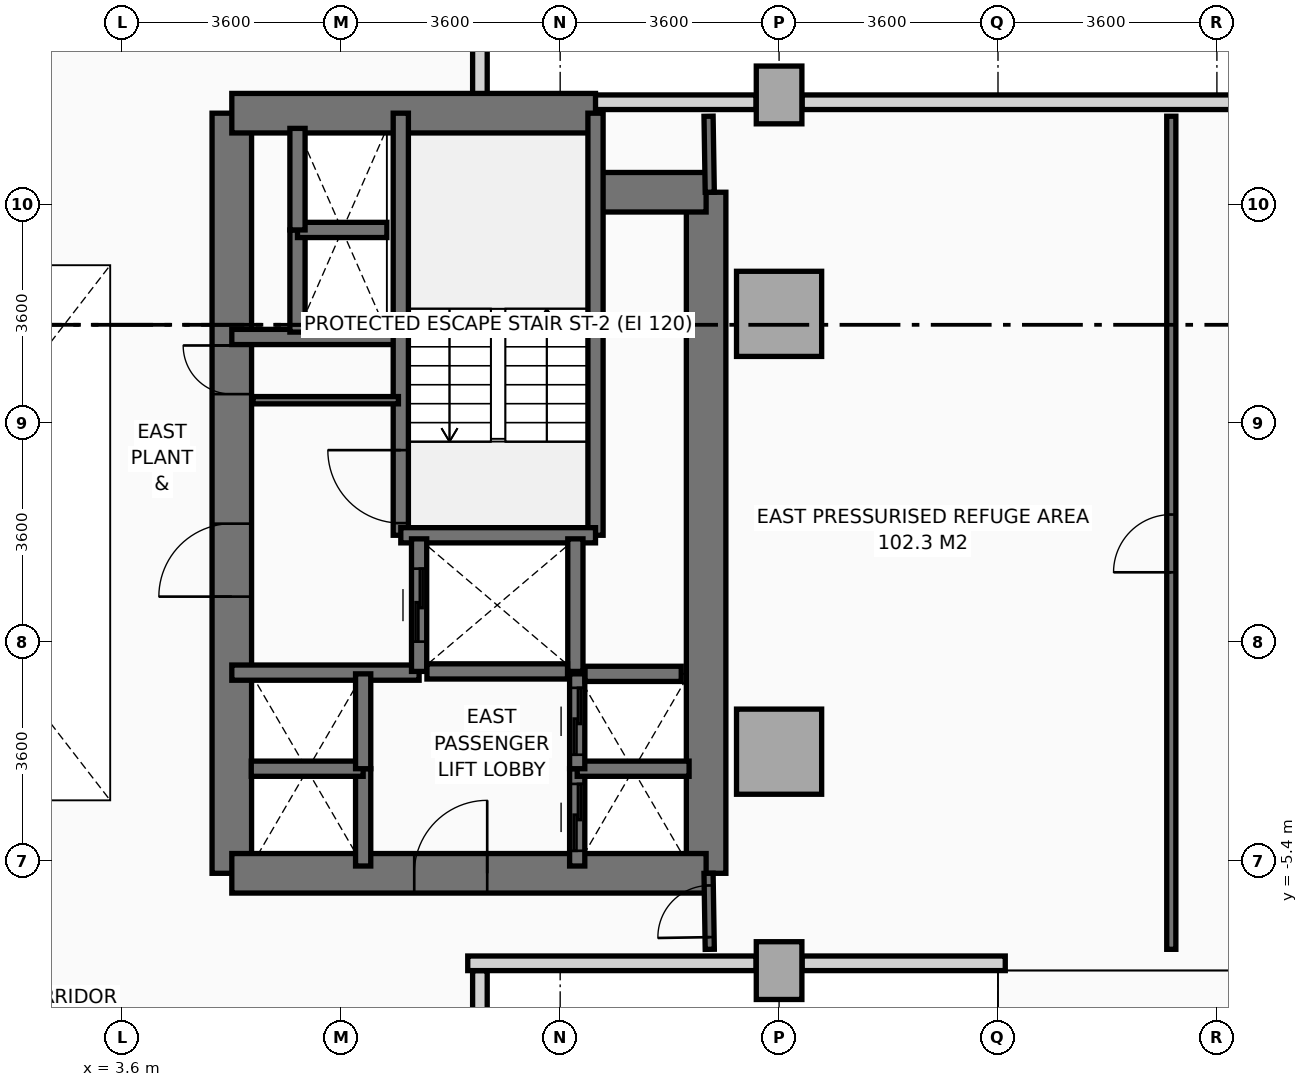
"""IFC4 building model, lengths in metres.
Left out: names, types, materials, properties, quantities, classifications, styles, units other than length and angle.
Written with IfcOpenShell. Run it as: python <this file> out.ifc"""

import sys

from ifc_helpers import new_model, si_unit, direction, frame, frame_2d, origin, origin_2d, place, context, subcontext, project, spatial, rectangle, extrude, source, transform, mapped, element, fill, save


model = new_model("IFC4")
c1 = context("Model", 3, precision=1e-05, world=origin(), true_north=direction((0.0, 1.0)))
c2 = subcontext(c1, "Body", "Model", "MODEL_VIEW")
j1 = project(units=[si_unit("LENGTHUNIT", "METRE"), si_unit("PLANEANGLEUNIT", "RADIAN")], contexts=[c1])
p1 = place(None, origin())
s1 = spatial("IfcSite", under=j1, at=p1, CompositionType="ELEMENT")
p2 = place(p1, origin())
s2 = spatial("IfcBuilding", under=s1, at=p2, CompositionType="ELEMENT")
p3 = place(p2, frame((0.0, 0.0, 25.2)))
s3 = spatial("IfcBuildingStorey", under=s2, at=p3, CompositionType="ELEMENT", Elevation=25.2)
m1 = source(origin(), c2, "Body", "SweptSolid", [
    extrude(rectangle(XDim=0.75, YDim=0.95, at=origin_2d()), origin(), (0.0, 0.0, 1.0), 5.2),
])
p4 = place(p3, frame((14.4, -7.2, 0.0), z_axis=(0.0, 0.0, 1.0), x_axis=(1.0, 0.0, 0.0)))
e1 = element("IfcColumn", 1, at=p4, inside=s3, PredefinedType="COLUMN", context=c2, shape_type="MappedRepresentation", body=[
    mapped(m1, transform((0.0, 0.0, 0.0), x_axis=(1.0, 0.0, 0.0), y_axis=(0.0, 1.0, 0.0), z_axis=(0.0, 0.0, 1.0), scale=1.0)),
])
m2 = source(origin(), c2, "Body", "SweptSolid", [
    extrude(rectangle(XDim=1.4, YDim=1.4, at=origin_2d()), origin(), (0.0, 0.0, 1.0), 5.2),
])
for number, where, z_axis, x_axis in (
    (2, (14.4, -3.6, 0.0), (0.0, 0.0, 1.0), (1.0, 0.0, 0.0)),
    (3, (14.4, 3.6, 0.0), (0.0, 0.0, 1.0), (1.0, 0.0, 0.0)),
):
    element("IfcColumn", number, at=place(p3, frame(where, z_axis=z_axis, x_axis=x_axis)), inside=s3, PredefinedType="COLUMN", context=c2, shape_type="MappedRepresentation", body=[
        mapped(m2, transform((0.0, 0.0, 0.0), x_axis=(1.0, 0.0, 0.0), y_axis=(0.0, 1.0, 0.0), z_axis=(0.0, 0.0, 1.0), scale=1.0)),
    ])
p5 = place(p3, frame((14.4, 7.2, 0.0), z_axis=(0.0, 0.0, 1.0), x_axis=(1.0, 0.0, 0.0)))
e4 = element("IfcColumn", 4, at=p5, inside=s3, PredefinedType="COLUMN", context=c2, shape_type="MappedRepresentation", body=[
    mapped(m1, transform((0.0, 0.0, 0.0), x_axis=(1.0, 0.0, 0.0), y_axis=(0.0, 1.0, 0.0), z_axis=(0.0, 0.0, 1.0), scale=1.0)),
])
p6 = place(p3, frame((18.119, -7.08, 0.0), z_axis=(0.0, 0.0, 1.0), x_axis=(-1.0, 0.0, 0.0)))
e5 = element("IfcWall", 5, at=p6, inside=s3, PredefinedType="PARAPET", context=c2, shape_type="SweptSolid", body=[
    extrude(rectangle(XDim=3.341, YDim=0.24, at=frame_2d((1.671, 0.0))), origin(), (0.0, 0.0, 1.0), 1.15),
])
p7 = place(p3, frame((14.022, -7.08, 0.0), z_axis=(0.0, 0.0, 1.0), x_axis=(-1.0, 0.0, 0.0)))
e6 = element("IfcWall", 6, at=p7, inside=s3, PredefinedType="PARAPET", context=c2, shape_type="SweptSolid", body=[
    extrude(rectangle(XDim=4.742, YDim=0.24, at=frame_2d((2.371, 0.0))), origin(), (0.0, 0.0, 1.0), 1.15),
])
p8 = place(p3, frame((9.48, -7.203, 0.0), z_axis=(0.0, 0.0, 1.0), x_axis=(0.0, -1.0, 0.0)))
e7 = element("IfcWall", 7, at=p8, inside=s3, PredefinedType="PARAPET", context=c2, shape_type="SweptSolid", body=[
    extrude(rectangle(XDim=1.586, YDim=0.24, at=frame_2d((0.793, 0.0))), origin(), (0.0, 0.0, 1.0), 1.15),
])
p9 = place(p3, frame((9.48, 8.789, 0.0), z_axis=(0.0, 0.0, 1.0), x_axis=(0.0, -1.0, 0.0)))
e8 = element("IfcWall", 8, at=p9, inside=s3, PredefinedType="PARAPET", context=c2, shape_type="SweptSolid", body=[
    extrude(rectangle(XDim=1.836, YDim=0.24, at=frame_2d((0.918, 0.0))), origin(), (0.0, 0.0, 1.0), 1.15),
])
p10 = place(p3, frame((11.295, 7.08, 0.0), z_axis=(0.0, 0.0, 1.0), x_axis=(1.0, 0.0, 0.0)))
e9 = element("IfcWall", 9, at=p10, inside=s3, PredefinedType="PARAPET", context=c2, shape_type="SweptSolid", body=[
    extrude(rectangle(XDim=2.727, YDim=0.24, at=frame_2d((1.364, 0.0))), origin(), (0.0, 0.0, 1.0), 1.15),
])
p11 = place(p3, frame((14.778, 7.08, 0.0), z_axis=(0.0, 0.0, 1.0), x_axis=(1.0, 0.0, 0.0)))
e10 = element("IfcWall", 10, at=p11, inside=s3, PredefinedType="PARAPET", context=c2, shape_type="SweptSolid", body=[
    extrude(rectangle(XDim=10.044, YDim=0.24, at=frame_2d((5.022, 0.0))), origin(), (0.0, 0.0, 1.0), 1.15),
])
p12 = place(p3, frame((13.2, -5.6, 0.0), z_axis=(0.0, 0.0, 1.0), x_axis=(0.0, 1.0, 0.0)))
e11 = element("IfcWall", 11, at=p12, inside=s3, PredefinedType="SHEAR", context=c2, shape_type="SweptSolid", body=[
    extrude(rectangle(XDim=11.2, YDim=0.65, at=frame_2d((5.6, 0.0))), origin(), (0.0, 0.0, 1.0), 5.2),
])
p13 = place(p3, frame((5.4, -5.6, 0.0), z_axis=(0.0, 0.0, 1.0), x_axis=(0.0, 1.0, 0.0)))
e12 = element("IfcWall", 12, at=p13, inside=s3, PredefinedType="SHEAR", context=c2, shape_type="SweptSolid", body=[
    extrude(rectangle(XDim=12.5, YDim=0.65, at=frame_2d((6.25, 0.0))), origin(), (0.0, 0.0, 1.0), 5.2),
])
p14 = place(p13, frame((4.55, 0.0, 0.0)))
e13 = element("IfcOpeningElement", 13, at=p14, cuts=e12, PredefinedType="OPENING", context=c2, shape_type="SweptSolid", body=[
    extrude(rectangle(XDim=1.2, YDim=2.2, at=frame_2d((0.6, 1.1))), frame((0.0, 0.335, 0.0), z_axis=(0.0, -1.0, 0.0), x_axis=(1.0, 0.0, 0.0)), (0.0, 0.0, 1.0), 0.67),
])
p15 = place(p13, frame((7.88, 0.0, 0.0)))
e14 = element("IfcOpeningElement", 14, at=p15, cuts=e12, PredefinedType="OPENING", context=c2, shape_type="SweptSolid", body=[
    extrude(rectangle(XDim=0.8, YDim=2.1, at=frame_2d((0.4, 1.05))), frame((0.0, 0.335, 0.0), z_axis=(0.0, -1.0, 0.0), x_axis=(1.0, 0.0, 0.0)), (0.0, 0.0, 1.0), 0.67),
])
p16 = place(p3, frame((5.4, 6.9, 0.0), z_axis=(0.0, 0.0, 1.0), x_axis=(1.0, 0.0, 0.0)))
e15 = element("IfcWall", 15, at=p16, inside=s3, PredefinedType="SHEAR", context=c2, shape_type="SweptSolid", body=[
    extrude(rectangle(XDim=5.981, YDim=0.65, at=frame_2d((2.991, 0.0))), origin(), (0.0, 0.0, 1.0), 5.2),
])
p17 = place(p3, frame((11.381, 5.6, 0.0), z_axis=(0.0, 0.0, 1.0), x_axis=(1.0, 0.0, 0.0)))
e16 = element("IfcWall", 16, at=p17, inside=s3, PredefinedType="SHEAR", context=c2, shape_type="SweptSolid", body=[
    extrude(rectangle(XDim=1.819, YDim=0.65, at=frame_2d((0.909, 0.0))), origin(), (0.0, 0.0, 1.0), 5.2),
])
p18 = place(p3, frame((5.4, -5.6, 0.0), z_axis=(0.0, 0.0, 1.0), x_axis=(1.0, 0.0, 0.0)))
e17 = element("IfcWall", 17, at=p18, inside=s3, PredefinedType="SHEAR", context=c2, shape_type="SweptSolid", body=[
    extrude(rectangle(XDim=7.8, YDim=0.65, at=frame_2d((3.9, 0.0))), origin(), (0.0, 0.0, 1.0), 5.2),
])
p19 = place(p18, frame((3.0, 0.0, 0.0)))
e18 = element("IfcOpeningElement", 18, at=p19, cuts=e17, PredefinedType="OPENING", context=c2, shape_type="SweptSolid", body=[
    extrude(rectangle(XDim=1.2, YDim=2.2, at=frame_2d((0.6, 1.1))), frame((0.0, 0.335, 0.0), z_axis=(0.0, -1.0, 0.0), x_axis=(1.0, 0.0, 0.0)), (0.0, 0.0, 1.0), 0.67),
])
p20 = place(p3, frame((5.4, 3.22, 0.0), z_axis=(0.0, 0.0, 1.0), x_axis=(1.0, 0.0, 0.0)))
e19 = element("IfcWall", 19, at=p20, inside=s3, PredefinedType="SOLIDWALL", context=c2, shape_type="SweptSolid", body=[
    extrude(rectangle(XDim=2.78, YDim=0.25, at=frame_2d((1.39, 0.0))), origin(), (0.0, 0.0, 1.0), 5.2),
])
p21 = place(p3, frame((5.4, -2.3, 0.0), z_axis=(0.0, 0.0, 1.0), x_axis=(1.0, 0.0, 0.0)))
e20 = element("IfcWall", 20, at=p21, inside=s3, PredefinedType="SOLIDWALL", context=c2, shape_type="SweptSolid", body=[
    extrude(rectangle(XDim=3.08, YDim=0.25, at=frame_2d((1.54, 0.0))), origin(), (0.0, 0.0, 1.0), 5.2),
])
p22 = place(p3, frame((8.179, -0.041, 0.0), z_axis=(0.0, 0.0, 1.0), x_axis=(0.0, 1.0, 0.0)))
e21 = element("IfcWall", 21, at=p22, inside=s3, PredefinedType="SOLIDWALL", context=c2, shape_type="SweptSolid", body=[
    extrude(rectangle(XDim=6.941, YDim=0.25, at=frame_2d((3.47, 0.0))), origin(), (0.0, 0.0, 1.0), 5.2),
])
p23 = place(p22, frame((0.2, 0.0, 0.0)))
e22 = element("IfcOpeningElement", 22, at=p23, cuts=e21, PredefinedType="OPENING", context=c2, shape_type="SweptSolid", body=[
    extrude(rectangle(XDim=1.2, YDim=2.2, at=frame_2d((0.6, 1.1))), frame((0.0, 0.135, 0.0), z_axis=(0.0, -1.0, 0.0), x_axis=(1.0, 0.0, 0.0)), (0.0, 0.0, 1.0), 0.27),
])
p24 = place(p3, frame((11.381, -0.041, 0.0), z_axis=(0.0, 0.0, 1.0), x_axis=(0.0, 1.0, 0.0)))
e23 = element("IfcWall", 23, at=p24, inside=s3, PredefinedType="SOLIDWALL", context=c2, shape_type="SweptSolid", body=[
    extrude(rectangle(XDim=6.941, YDim=0.25, at=frame_2d((3.47, 0.0))), origin(), (0.0, 0.0, 1.0), 5.2),
])
p25 = place(p3, frame((8.179, -0.041, 0.0), z_axis=(0.0, 0.0, 1.0), x_axis=(1.0, 0.0, 0.0)))
e24 = element("IfcWall", 24, at=p25, inside=s3, PredefinedType="SOLIDWALL", context=c2, shape_type="SweptSolid", body=[
    extrude(rectangle(XDim=3.202, YDim=0.25, at=frame_2d((1.601, 0.0))), origin(), (0.0, 0.0, 1.0), 5.2),
])
p26 = place(p3, frame((8.48, -2.28, 0.0), z_axis=(0.0, 0.0, 1.0), x_axis=(0.0, 1.0, 0.0)))
e25 = element("IfcWall", 25, at=p26, inside=s3, PredefinedType="SOLIDWALL", context=c2, shape_type="SweptSolid", body=[
    extrude(rectangle(XDim=2.18, YDim=0.25, at=frame_2d((1.09, 0.0))), origin(), (0.0, 0.0, 1.0), 5.2),
])
p27 = place(p26, frame((0.49, 0.0, 0.0)))
e26 = element("IfcOpeningElement", 26, at=p27, cuts=e25, PredefinedType="OPENING", context=c2, shape_type="SweptSolid", body=[
    extrude(rectangle(XDim=1.2, YDim=2.2, at=frame_2d((0.6, 1.1))), frame((0.0, 0.135, 0.0), z_axis=(0.0, -1.0, 0.0), x_axis=(1.0, 0.0, 0.0)), (0.0, 0.0, 1.0), 0.27),
])
p28 = place(p3, frame((11.05, -2.28, 0.0), z_axis=(0.0, 0.0, 1.0), x_axis=(0.0, 1.0, 0.0)))
e27 = element("IfcWall", 27, at=p28, inside=s3, PredefinedType="SOLIDWALL", context=c2, shape_type="SweptSolid", body=[
    extrude(rectangle(XDim=2.18, YDim=0.25, at=frame_2d((1.09, 0.0))), origin(), (0.0, 0.0, 1.0), 5.2),
])
p29 = place(p3, frame((8.609, -2.28, 0.0), z_axis=(0.0, 0.0, 1.0), x_axis=(1.0, 0.0, 0.0)))
e28 = element("IfcWall", 28, at=p29, inside=s3, PredefinedType="SOLIDWALL", context=c2, shape_type="SweptSolid", body=[
    extrude(rectangle(XDim=2.312, YDim=0.25, at=frame_2d((1.156, 0.0))), origin(), (0.0, 0.0, 1.0), 5.2),
])
p30 = place(p3, frame((11.08, -5.48, 0.0), z_axis=(0.0, 0.0, 1.0), x_axis=(0.0, 1.0, 0.0)))
e29 = element("IfcWall", 29, at=p30, inside=s3, PredefinedType="SOLIDWALL", context=c2, shape_type="SweptSolid", body=[
    extrude(rectangle(XDim=1.6, YDim=0.25, at=frame_2d((0.8, 0.0))), origin(), (0.0, 0.0, 1.0), 5.2),
])
p31 = place(p30, frame((0.25, 0.0, 0.0)))
e30 = element("IfcOpeningElement", 30, at=p31, cuts=e29, PredefinedType="OPENING", context=c2, shape_type="SweptSolid", body=[
    extrude(rectangle(XDim=1.1, YDim=2.2, at=frame_2d((0.55, 1.1))), frame((0.0, 0.135, 0.0), z_axis=(0.0, -1.0, 0.0), x_axis=(1.0, 0.0, 0.0)), (0.0, 0.0, 1.0), 0.27),
])
p32 = place(p3, frame((11.08, -3.88, 0.0), z_axis=(0.0, 0.0, 1.0), x_axis=(1.0, 0.0, 0.0)))
e31 = element("IfcWall", 31, at=p32, inside=s3, PredefinedType="SOLIDWALL", context=c2, shape_type="SweptSolid", body=[
    extrude(rectangle(XDim=1.84, YDim=0.25, at=frame_2d((0.92, 0.0))), origin(), (0.0, 0.0, 1.0), 5.2),
])
p33 = place(p3, frame((11.08, -3.88, 0.0), z_axis=(0.0, 0.0, 1.0), x_axis=(0.0, 1.0, 0.0)))
e32 = element("IfcWall", 32, at=p33, inside=s3, PredefinedType="SOLIDWALL", context=c2, shape_type="SweptSolid", body=[
    extrude(rectangle(XDim=1.56, YDim=0.25, at=frame_2d((0.78, 0.0))), origin(), (0.0, 0.0, 1.0), 5.2),
])
p34 = place(p33, frame((0.23, 0.0, 0.0)))
e33 = element("IfcOpeningElement", 33, at=p34, cuts=e32, PredefinedType="OPENING", context=c2, shape_type="SweptSolid", body=[
    extrude(rectangle(XDim=1.1, YDim=2.2, at=frame_2d((0.55, 1.1))), frame((0.0, 0.135, 0.0), z_axis=(0.0, -1.0, 0.0), x_axis=(1.0, 0.0, 0.0)), (0.0, 0.0, 1.0), 0.27),
])
p35 = place(p3, frame((11.209, -2.32, 0.0), z_axis=(0.0, 0.0, 1.0), x_axis=(1.0, 0.0, 0.0)))
e34 = element("IfcWall", 34, at=p35, inside=s3, PredefinedType="SOLIDWALL", context=c2, shape_type="SweptSolid", body=[
    extrude(rectangle(XDim=1.582, YDim=0.25, at=frame_2d((0.791, 0.0))), origin(), (0.0, 0.0, 1.0), 5.2),
])
p36 = place(p3, frame((7.56, -5.48, 0.0), z_axis=(0.0, 0.0, 1.0), x_axis=(0.0, 1.0, 0.0)))
e35 = element("IfcWall", 35, at=p36, inside=s3, PredefinedType="SOLIDWALL", context=c2, shape_type="SweptSolid", body=[
    extrude(rectangle(XDim=1.6, YDim=0.25, at=frame_2d((0.8, 0.0))), origin(), (0.0, 0.0, 1.0), 5.2),
])
p37 = place(p3, frame((5.72, -3.88, 0.0), z_axis=(0.0, 0.0, 1.0), x_axis=(1.0, 0.0, 0.0)))
e36 = element("IfcWall", 36, at=p37, inside=s3, PredefinedType="SOLIDWALL", context=c2, shape_type="SweptSolid", body=[
    extrude(rectangle(XDim=1.84, YDim=0.25, at=frame_2d((0.92, 0.0))), origin(), (0.0, 0.0, 1.0), 5.2),
])
p38 = place(p3, frame((7.56, -3.88, 0.0), z_axis=(0.0, 0.0, 1.0), x_axis=(0.0, 1.0, 0.0)))
e37 = element("IfcWall", 37, at=p38, inside=s3, PredefinedType="SOLIDWALL", context=c2, shape_type="SweptSolid", body=[
    extrude(rectangle(XDim=1.56, YDim=0.25, at=frame_2d((0.78, 0.0))), origin(), (0.0, 0.0, 1.0), 5.2),
])
p39 = place(p3, frame((6.48, 3.3, 0.0), z_axis=(0.0, 0.0, 1.0), x_axis=(0.0, 1.0, 0.0)))
e38 = element("IfcWall", 38, at=p39, inside=s3, PredefinedType="SOLIDWALL", context=c2, shape_type="SweptSolid", body=[
    extrude(rectangle(XDim=1.68, YDim=0.25, at=frame_2d((0.84, 0.0))), origin(), (0.0, 0.0, 1.0), 5.2),
])
p40 = place(p3, frame((6.48, 4.98, 0.0), z_axis=(0.0, 0.0, 1.0), x_axis=(1.0, 0.0, 0.0)))
e39 = element("IfcWall", 39, at=p40, inside=s3, PredefinedType="SOLIDWALL", context=c2, shape_type="SweptSolid", body=[
    extrude(rectangle(XDim=1.47, YDim=0.25, at=frame_2d((0.735, 0.0))), origin(), (0.0, 0.0, 1.0), 5.2),
])
p41 = place(p3, frame((6.48, 4.98, 0.0), z_axis=(0.0, 0.0, 1.0), x_axis=(0.0, 1.0, 0.0)))
e40 = element("IfcWall", 40, at=p41, inside=s3, PredefinedType="SOLIDWALL", context=c2, shape_type="SweptSolid", body=[
    extrude(rectangle(XDim=1.67, YDim=0.25, at=frame_2d((0.835, 0.0))), origin(), (0.0, 0.0, 1.0), 5.2),
])
p42 = place(p3, frame((5.75, 2.18, 0.0), z_axis=(0.0, 0.0, 1.0), x_axis=(1.0, 0.0, 0.0)))
e41 = element("IfcWall", 41, at=p42, inside=s3, PredefinedType="PARTITIONING", context=c2, shape_type="SweptSolid", body=[
    extrude(rectangle(XDim=2.39, YDim=0.12, at=frame_2d((1.195, 0.0))), origin(), (0.0, 0.0, 1.0), 4.3),
])
p43 = place(p3, frame((13.26, -6.85, 0.0), z_axis=(0.0, 0.0, 1.0), x_axis=(-0.016013571389, 0.999871774545, 0.0)))
e42 = element("IfcWall", 42, at=p43, inside=s3, PredefinedType="PARTITIONING", context=c2, shape_type="SweptSolid", body=[
    extrude(rectangle(XDim=1.25, YDim=0.15, at=frame_2d((0.625, 0.0))), origin(), (0.0, 0.0, 1.0), 5.2),
])
p44 = place(p43, frame((0.2, 0.0, 0.0)))
e43 = element("IfcOpeningElement", 43, at=p44, cuts=e42, PredefinedType="OPENING", context=c2, shape_type="SweptSolid", body=[
    extrude(rectangle(XDim=0.85, YDim=2.1, at=frame_2d((0.425, 1.05))), frame((0.0, 0.085, 0.0), z_axis=(0.0, -1.0, 0.0), x_axis=(1.0, 0.0, 0.0)), (0.0, 0.0, 1.0), 0.17),
])
p45 = place(p3, frame((13.26, 5.6, 0.0), z_axis=(0.0, 0.0, 1.0), x_axis=(-0.016013571389, 0.999871774545, 0.0)))
e44 = element("IfcWall", 44, at=p45, inside=s3, PredefinedType="PARTITIONING", context=c2, shape_type="SweptSolid", body=[
    extrude(rectangle(XDim=1.25, YDim=0.15, at=frame_2d((0.625, 0.0))), origin(), (0.0, 0.0, 1.0), 5.2),
])
p46 = place(p3, frame((20.85, -6.85, 0.0), z_axis=(0.0, 0.0, 1.0), x_axis=(0.0, 1.0, 0.0)))
e45 = element("IfcWall", 45, at=p46, inside=s3, PredefinedType="PARTITIONING", context=c2, shape_type="SweptSolid", body=[
    extrude(rectangle(XDim=13.7, YDim=0.15, at=frame_2d((6.85, 0.0))), origin(), (0.0, 0.0, 1.0), 3.4),
])
p47 = place(p46, frame((6.2, 0.0, 0.0)))
e46 = element("IfcOpeningElement", 46, at=p47, cuts=e45, PredefinedType="OPENING", context=c2, shape_type="SweptSolid", body=[
    extrude(rectangle(XDim=0.95, YDim=2.15, at=frame_2d((0.475, 1.075))), frame((0.0, 0.085, 0.0), z_axis=(0.0, -1.0, 0.0), x_axis=(1.0, 0.0, 0.0)), (0.0, 0.0, 1.0), 0.17),
])
m3 = source(origin(), c2, "Body", "SweptSolid", [
    extrude(rectangle(XDim=1.2, YDim=2.2, at=frame_2d((0.6, 1.1))), frame((0.0, 0.025, 0.0), z_axis=(0.0, -1.0, 0.0), x_axis=(1.0, 0.0, 0.0)), (0.0, 0.0, 1.0), 0.05),
])
p48 = place(p23, origin())
e47 = element("IfcDoor", 47, at=p48, inside=s3, OperationType="SINGLE_SWING_RIGHT", PredefinedType="DOOR", context=c2, shape_type="MappedRepresentation", body=[
    mapped(m3, transform((0.0, 0.0, 0.0), x_axis=(1.0, 0.0, 0.0), y_axis=(0.0, 1.0, 0.0), z_axis=(0.0, 0.0, 1.0), scale=1.0)),
])
fill(e22, e47)
p49 = place(p14, origin())
e48 = element("IfcDoor", 48, at=p49, inside=s3, OperationType="SINGLE_SWING_LEFT", PredefinedType="DOOR", context=c2, shape_type="MappedRepresentation", body=[
    mapped(m3, transform((0.0, 0.0, 0.0), x_axis=(1.0, 0.0, 0.0), y_axis=(0.0, 1.0, 0.0), z_axis=(0.0, 0.0, 1.0), scale=1.0)),
])
fill(e13, e48)
p50 = place(p19, origin())
e49 = element("IfcDoor", 49, at=p50, inside=s3, OperationType="SINGLE_SWING_RIGHT", PredefinedType="DOOR", context=c2, shape_type="MappedRepresentation", body=[
    mapped(m3, transform((0.0, 0.0, 0.0), x_axis=(1.0, 0.0, 0.0), y_axis=(0.0, 1.0, 0.0), z_axis=(0.0, 0.0, 1.0), scale=1.0)),
])
fill(e18, e49)
m4 = source(origin(), c2, "Body", "SweptSolid", [
    extrude(rectangle(XDim=0.8, YDim=2.1, at=frame_2d((0.4, 1.05))), frame((0.0, 0.025, 0.0), z_axis=(0.0, -1.0, 0.0), x_axis=(1.0, 0.0, 0.0)), (0.0, 0.0, 1.0), 0.05),
])
p51 = place(p15, origin())
e50 = element("IfcDoor", 50, at=p51, inside=s3, OperationType="SINGLE_SWING_RIGHT", PredefinedType="DOOR", context=c2, shape_type="MappedRepresentation", body=[
    mapped(m4, transform((0.0, 0.0, 0.0), x_axis=(1.0, 0.0, 0.0), y_axis=(0.0, 1.0, 0.0), z_axis=(0.0, 0.0, 1.0), scale=1.0)),
])
fill(e14, e50)
p52 = place(p27, origin())
e51 = element("IfcDoor", 51, at=p52, inside=s3, OperationType="SLIDING_TO_RIGHT", PredefinedType="DOOR", context=c2, shape_type="MappedRepresentation", body=[
    mapped(m3, transform((0.0, 0.0, 0.0), x_axis=(1.0, 0.0, 0.0), y_axis=(0.0, 1.0, 0.0), z_axis=(0.0, 0.0, 1.0), scale=1.0)),
])
fill(e26, e51)
m5 = source(origin(), c2, "Body", "SweptSolid", [
    extrude(rectangle(XDim=1.1, YDim=2.2, at=frame_2d((0.55, 1.1))), frame((0.0, 0.025, 0.0), z_axis=(0.0, -1.0, 0.0), x_axis=(1.0, 0.0, 0.0)), (0.0, 0.0, 1.0), 0.05),
])
p53 = place(p31, origin())
e52 = element("IfcDoor", 52, at=p53, inside=s3, OperationType="SLIDING_TO_LEFT", PredefinedType="DOOR", context=c2, shape_type="MappedRepresentation", body=[
    mapped(m5, transform((0.0, 0.0, 0.0), x_axis=(1.0, 0.0, 0.0), y_axis=(0.0, 1.0, 0.0), z_axis=(0.0, 0.0, 1.0), scale=1.0)),
])
fill(e30, e52)
p54 = place(p34, origin())
e53 = element("IfcDoor", 53, at=p54, inside=s3, OperationType="SLIDING_TO_LEFT", PredefinedType="DOOR", context=c2, shape_type="MappedRepresentation", body=[
    mapped(m5, transform((0.0, 0.0, 0.0), x_axis=(1.0, 0.0, 0.0), y_axis=(0.0, 1.0, 0.0), z_axis=(0.0, 0.0, 1.0), scale=1.0)),
])
fill(e33, e53)
m6 = source(origin(), c2, "Body", "SweptSolid", [
    extrude(rectangle(XDim=0.95, YDim=2.15, at=frame_2d((0.475, 1.075))), frame((0.0, 0.025, 0.0), z_axis=(0.0, -1.0, 0.0), x_axis=(1.0, 0.0, 0.0)), (0.0, 0.0, 1.0), 0.05),
])
p55 = place(p47, origin())
e54 = element("IfcDoor", 54, at=p55, inside=s3, OperationType="SINGLE_SWING_LEFT", PredefinedType="DOOR", context=c2, shape_type="MappedRepresentation", body=[
    mapped(m6, transform((0.0, 0.0, 0.0), x_axis=(1.0, 0.0, 0.0), y_axis=(0.0, 1.0, 0.0), z_axis=(0.0, 0.0, 1.0), scale=1.0)),
])
fill(e46, e54)
m7 = source(origin(), c2, "Body", "SweptSolid", [
    extrude(rectangle(XDim=0.85, YDim=2.1, at=frame_2d((0.425, 1.05))), frame((0.0, 0.025, 0.0), z_axis=(0.0, -1.0, 0.0), x_axis=(1.0, 0.0, 0.0)), (0.0, 0.0, 1.0), 0.05),
])
p56 = place(p44, origin())
e55 = element("IfcDoor", 55, at=p56, inside=s3, OperationType="SINGLE_SWING_LEFT", PredefinedType="DOOR", context=c2, shape_type="MappedRepresentation", body=[
    mapped(m7, transform((0.0, 0.0, 0.0), x_axis=(1.0, 0.0, 0.0), y_axis=(0.0, 1.0, 0.0), z_axis=(0.0, 0.0, 1.0), scale=1.0)),
])
fill(e43, e55)
save(model, sys.argv[1])
